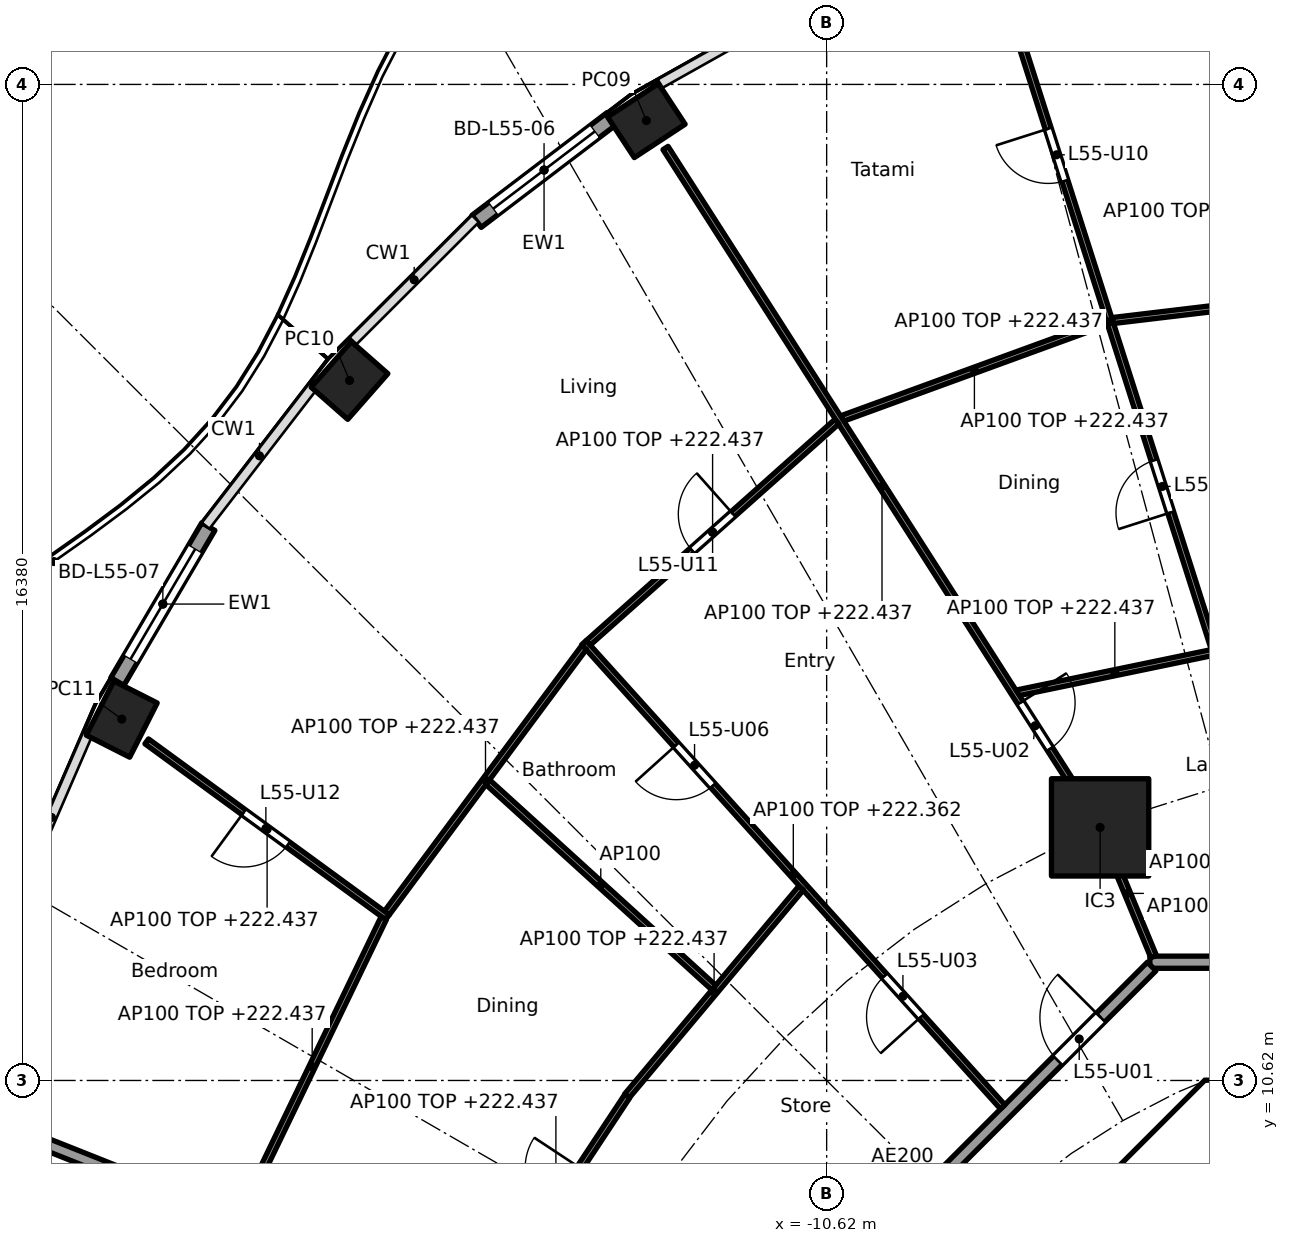
"""IFC4 building model, lengths in metres.
Left out: names, types, materials, properties, quantities, classifications, styles, units other than length and angle.
Written with IfcOpenShell. Run it as: python <this file> out.ifc"""

import sys

from ifc_helpers import new_model, si_unit, direction, frame, frame_2d, origin, origin_2d, place, context, subcontext, project, spatial, polyline, rectangle, hollow_rectangle, outline, extrude, element, fill, save


model = new_model("IFC4")
c1 = context("Model", 3, precision=1e-05, world=origin(), true_north=direction((0.0, 1.0)))
c2 = subcontext(c1, "Body", "Model", "MODEL_VIEW")
j1 = project(units=[si_unit("LENGTHUNIT", "METRE"), si_unit("PLANEANGLEUNIT", "RADIAN")], contexts=[c1])
p1 = place(None, origin())
s1 = spatial("IfcSite", under=j1, at=p1, CompositionType="ELEMENT")
p2 = place(p1, origin())
s2 = spatial("IfcBuilding", under=s1, at=p2, CompositionType="ELEMENT")
p3 = place(p2, frame((0.0, 0.0, 219.6)))
s3 = spatial("IfcBuildingStorey", under=s2, at=p3, CompositionType="ELEMENT", Elevation=219.6)
for number, where, z_axis, x_axis in (
    (1, (-13.585, 26.405, 0.0), (0.0, 0.0, 1.0), (-0.836, -0.549, 0.0)),
    (2, (-18.467, 22.132, 0.0), (0.0, 0.0, 1.0), (-0.66, -0.751, 0.0)),
    (3, (-22.212, 16.563, 0.0), (0.0, 0.0, 1.0), (-0.452, -0.892, 0.0)),
):
    element("IfcColumn", number, at=place(p3, frame(where, z_axis=z_axis, x_axis=x_axis)), inside=s3, PredefinedType="COLUMN", context=c2, shape_type="SweptSolid", body=[
        extrude(hollow_rectangle(XDim=1.0, YDim=0.8, WallThickness=0.032, at=origin_2d()), origin(), (0.0, 0.0, 1.0), 3.7),
    ])
p4 = place(p3, frame((-6.123, 14.782, 0.0), z_axis=(0.0, 0.0, 1.0), x_axis=(1.0, 0.0, 0.0)))
e4 = element("IfcColumn", 4, at=p4, inside=s3, PredefinedType="COLUMN", context=c2, shape_type="SweptSolid", body=[
    extrude(rectangle(XDim=1.6, YDim=1.6, at=origin_2d()), origin(), (0.0, 0.0, 1.0), 3.7),
])
p5 = place(p3, frame((-16.377, 24.748, 0.0), z_axis=(0.0, 0.0, 1.0), x_axis=(0.795990084031, 0.60530966135, 0.0)))
e5 = element("IfcWall", 5, at=p5, inside=s3, PredefinedType="SOLIDWALL", context=c2, shape_type="SweptSolid", body=[
    extrude(rectangle(XDim=2.789, YDim=0.25, at=frame_2d((1.394, 0.0))), origin(), (0.0, 0.0, 1.0), 3.44),
])
p6 = place(p5, frame((0.344, 0.0, 0.0)))
e6 = element("IfcOpeningElement", 6, at=p6, cuts=e5, PredefinedType="OPENING", context=c2, shape_type="SweptSolid", body=[
    extrude(rectangle(XDim=2.1, YDim=2.4, at=frame_2d((1.05, 1.2))), frame((0.0, 0.135, 0.0), z_axis=(0.0, -1.0, 0.0), x_axis=(1.0, 0.0, 0.0)), (0.0, 0.0, 1.0), 0.27),
])
p7 = place(p3, frame((-22.284, 17.181, 0.0), z_axis=(0.0, 0.0, 1.0), x_axis=(0.506330171469, 0.862339699573, 0.0)))
e7 = element("IfcWall", 7, at=p7, inside=s3, PredefinedType="SOLIDWALL", context=c2, shape_type="SweptSolid", body=[
    extrude(rectangle(XDim=2.954, YDim=0.25, at=frame_2d((1.477, 0.0))), origin(), (0.0, 0.0, 1.0), 3.44),
])
p8 = place(p7, frame((0.427, 0.0, 0.0)))
e8 = element("IfcOpeningElement", 8, at=p8, cuts=e7, PredefinedType="OPENING", context=c2, shape_type="SweptSolid", body=[
    extrude(rectangle(XDim=2.1, YDim=2.4, at=frame_2d((1.05, 1.2))), frame((0.0, 0.135, 0.0), z_axis=(0.0, -1.0, 0.0), x_axis=(1.0, 0.0, 0.0)), (0.0, 0.0, 1.0), 0.27),
])
p9 = place(p3, frame((-4.613, 9.988, 0.0), z_axis=(0.0, 0.0, 1.0), x_axis=(-0.707106781187, -0.707106781187, 0.0)))
e9 = element("IfcWall", 9, at=p9, inside=s3, PredefinedType="SHEAR", context=c2, shape_type="SweptSolid", body=[
    extrude(rectangle(XDim=7.602, YDim=0.6, at=frame_2d((3.801, 0.0))), origin(), (0.0, 0.0, 1.0), 3.44),
])
p10 = place(p9, frame((0.351, 0.0, 0.0)))
e10 = element("IfcOpeningElement", 10, at=p10, cuts=e9, PredefinedType="OPENING", context=c2, shape_type="SweptSolid", body=[
    extrude(rectangle(XDim=1.1, YDim=2.1, at=frame_2d((0.55, 1.05))), frame((0.0, 0.31, 0.0), z_axis=(0.0, -1.0, 0.0), x_axis=(1.0, 0.0, 0.0)), (0.0, 0.0, 1.0), 0.62),
])
p11 = place(p3, origin())
e11 = element("IfcWall", 11, at=p11, inside=s3, PredefinedType="SHEAR", context=c2, shape_type="SweptSolid", body=[
    extrude(outline(polyline([(-4.152, 10.025), (-4.401, 9.776), (-4.825, 10.2), (-4.401, 10.625), (4.401, 10.625), (4.825, 10.2), (4.401, 9.776), (4.152, 10.025), (-4.152, 10.025)])), origin(), (0.0, 0.0, 1.0), 3.44),
])
p12 = place(p3, frame((-14.829, 6.141, 0.0), z_axis=(0.0, 0.0, 1.0), x_axis=(-0.929202069098, 0.36957206981, 0.0)))
e12 = element("IfcWall", 12, at=p12, inside=s3, PredefinedType="PARTITIONING", context=c2, shape_type="SweptSolid", body=[
    extrude(rectangle(XDim=9.957, YDim=0.2, at=frame_2d((4.978, 0.0))), origin(), (0.0, 0.0, 1.0), 2.837),
])
p13 = place(p3, frame((5.104, 12.565, 0.0), z_axis=(0.0, 0.0, 1.0), x_axis=(-1.0, 0.0, 0.0)))
e13 = element("IfcWall", 13, at=p13, inside=s3, PredefinedType="PARTITIONING", context=c2, shape_type="SweptSolid", body=[
    extrude(rectangle(XDim=10.409, YDim=0.2, at=frame_2d((5.205, 0.0))), origin(), (0.0, 0.0, 1.0), 3.44),
])
p14 = place(p3, frame((-5.275, 12.494, 0.0), z_axis=(0.0, 0.0, 1.0), x_axis=(-0.707106781187, -0.707106781187, 0.0)))
e14 = element("IfcWall", 14, at=p14, inside=s3, PredefinedType="PARTITIONING", context=c2, shape_type="SweptSolid", body=[
    extrude(rectangle(XDim=10.209, YDim=0.2, at=frame_2d((5.104, 0.0))), origin(), (0.0, 0.0, 1.0), 3.44),
])
p15 = place(p14, frame((1.185, 0.0, 0.0)))
e15 = element("IfcOpeningElement", 15, at=p15, cuts=e14, PredefinedType="OPENING", context=c2, shape_type="SweptSolid", body=[
    extrude(rectangle(XDim=1.0, YDim=2.1, at=frame_2d((0.5, 1.05))), frame((0.0, 0.11, 0.0), z_axis=(0.0, -1.0, 0.0), x_axis=(1.0, 0.0, 0.0)), (0.0, 0.0, 1.0), 0.22),
])
p16 = place(p3, frame((-1.066, 23.695, 0.0), z_axis=(0.0, 0.0, 1.0), x_axis=(-0.992962413335, -0.118429918957, 0.0)))
e16 = element("IfcWall", 16, at=p16, inside=s3, PredefinedType="PARTITIONING", context=c2, shape_type="SweptSolid", body=[
    extrude(rectangle(XDim=4.886, YDim=0.1, at=frame_2d((2.443, 0.0))), origin(), (0.0, 0.0, 1.0), 2.837),
])
p17 = place(p16, frame((2.018, 0.0, 0.0)))
e17 = element("IfcOpeningElement", 17, at=p17, cuts=e16, PredefinedType="OPENING", context=c2, shape_type="SweptSolid", body=[
    extrude(rectangle(XDim=0.9, YDim=2.1, at=frame_2d((0.45, 1.05))), frame((0.0, 0.06, 0.0), z_axis=(0.0, -1.0, 0.0), x_axis=(1.0, 0.0, 0.0)), (0.0, 0.0, 1.0), 0.12),
])
p18 = place(p3, frame((-4.215, 17.62, 0.0), z_axis=(0.0, 0.0, 1.0), x_axis=(-0.303985237897, 0.952676742206, 0.0)))
e18 = element("IfcWall", 18, at=p18, inside=s3, PredefinedType="PARTITIONING", context=c2, shape_type="SweptSolid", body=[
    extrude(rectangle(XDim=11.499, YDim=0.1, at=frame_2d((5.75, 0.0))), origin(), (0.0, 0.0, 1.0), 2.837),
])
p19 = place(p18, frame((2.457, 0.0, 0.0)))
e19 = element("IfcOpeningElement", 19, at=p19, cuts=e18, PredefinedType="OPENING", context=c2, shape_type="SweptSolid", body=[
    extrude(rectangle(XDim=0.9, YDim=2.1, at=frame_2d((0.45, 1.05))), frame((0.0, 0.06, 0.0), z_axis=(0.0, -1.0, 0.0), x_axis=(1.0, 0.0, 0.0)), (0.0, 0.0, 1.0), 0.12),
])
p20 = place(p18, frame((8.181, 0.0, 0.0)))
e20 = element("IfcOpeningElement", 20, at=p20, cuts=e18, PredefinedType="OPENING", context=c2, shape_type="SweptSolid", body=[
    extrude(rectangle(XDim=0.9, YDim=2.1, at=frame_2d((0.45, 1.05))), frame((0.0, 0.06, 0.0), z_axis=(0.0, -1.0, 0.0), x_axis=(1.0, 0.0, 0.0)), (0.0, 0.0, 1.0), 0.12),
])
p21 = place(p3, frame((-4.28, 17.657, 0.0), z_axis=(0.0, 0.0, 1.0), x_axis=(-0.979205232861, -0.202872156637, 0.0)))
e21 = element("IfcWall", 21, at=p21, inside=s3, PredefinedType="PARTITIONING", context=c2, shape_type="SweptSolid", body=[
    extrude(rectangle(XDim=3.271, YDim=0.1, at=frame_2d((1.635, 0.0))), origin(), (0.0, 0.0, 1.0), 2.837),
])
p22 = place(p3, frame((-6.014, 23.094, 0.0), z_axis=(0.0, 0.0, 1.0), x_axis=(-0.939417400947, -0.342775359089, 0.0)))
e22 = element("IfcWall", 22, at=p22, inside=s3, PredefinedType="PARTITIONING", context=c2, shape_type="SweptSolid", body=[
    extrude(rectangle(XDim=4.633, YDim=0.1, at=frame_2d((2.316, 0.0))), origin(), (0.0, 0.0, 1.0), 2.837),
])
p23 = place(p3, frame((-5.243, 12.657, 0.0), z_axis=(0.0, 0.0, 1.0), x_axis=(-0.382757529444, 0.923848837015, 0.0)))
e23 = element("IfcWall", 23, at=p23, inside=s3, PredefinedType="PARTITIONING", context=c2, shape_type="SweptSolid", body=[
    extrude(rectangle(XDim=2.25, YDim=0.1, at=frame_2d((1.125, 0.0))), origin(), (0.0, 0.0, 1.0), 3.44),
])
p24 = place(p3, frame((-6.15, 14.824, 0.0), z_axis=(0.0, 0.0, 1.0), x_axis=(-0.538870687577, 0.842388498301, 0.0)))
e24 = element("IfcWall", 24, at=p24, inside=s3, PredefinedType="PARTITIONING", context=c2, shape_type="SweptSolid", body=[
    extrude(rectangle(XDim=13.213, YDim=0.1, at=frame_2d((6.606, 0.0))), origin(), (0.0, 0.0, 1.0), 2.837),
])
p25 = place(p24, frame((1.483, 0.0, 0.0)))
e25 = element("IfcOpeningElement", 25, at=p25, cuts=e24, PredefinedType="OPENING", context=c2, shape_type="SweptSolid", body=[
    extrude(rectangle(XDim=0.9, YDim=2.1, at=frame_2d((0.45, 1.05))), frame((0.0, 0.06, 0.0), z_axis=(0.0, -1.0, 0.0), x_axis=(1.0, 0.0, 0.0)), (0.0, 0.0, 1.0), 0.12),
])
p26 = place(p3, frame((-10.45, 21.455, 0.0), z_axis=(0.0, 0.0, 1.0), x_axis=(-0.747150931973, -0.66465441009, 0.0)))
e26 = element("IfcWall", 26, at=p26, inside=s3, PredefinedType="PARTITIONING", context=c2, shape_type="SweptSolid", body=[
    extrude(rectangle(XDim=5.475, YDim=0.1, at=frame_2d((2.737, 0.0))), origin(), (0.0, 0.0, 1.0), 2.837),
])
p27 = place(p26, frame((2.288, 0.0, 0.0)))
e27 = element("IfcOpeningElement", 27, at=p27, cuts=e26, PredefinedType="OPENING", context=c2, shape_type="SweptSolid", body=[
    extrude(rectangle(XDim=0.9, YDim=2.1, at=frame_2d((0.45, 1.05))), frame((0.0, 0.06, 0.0), z_axis=(0.0, -1.0, 0.0), x_axis=(1.0, 0.0, 0.0)), (0.0, 0.0, 1.0), 0.12),
])
p28 = place(p3, frame((-7.725, 10.186, 0.0), z_axis=(0.0, 0.0, 1.0), x_axis=(-0.669819599194, 0.742523874725, 0.0)))
e28 = element("IfcWall", 28, at=p28, inside=s3, PredefinedType="PARTITIONING", context=c2, shape_type="SweptSolid", body=[
    extrude(rectangle(XDim=10.282, YDim=0.1, at=frame_2d((5.141, 0.0))), origin(), (0.0, 0.0, 1.0), 2.762),
])
p29 = place(p28, frame((2.0, 0.0, 0.0)))
e29 = element("IfcOpeningElement", 29, at=p29, cuts=e28, PredefinedType="OPENING", context=c2, shape_type="SweptSolid", body=[
    extrude(rectangle(XDim=0.9, YDim=2.1, at=frame_2d((0.45, 1.05))), frame((0.0, 0.06, 0.0), z_axis=(0.0, -1.0, 0.0), x_axis=(1.0, 0.0, 0.0)), (0.0, 0.0, 1.0), 0.12),
])
p30 = place(p28, frame((7.116, 0.0, 0.0)))
e30 = element("IfcOpeningElement", 30, at=p30, cuts=e28, PredefinedType="OPENING", context=c2, shape_type="SweptSolid", body=[
    extrude(rectangle(XDim=0.9, YDim=2.1, at=frame_2d((0.45, 1.05))), frame((0.0, 0.06, 0.0), z_axis=(0.0, -1.0, 0.0), x_axis=(1.0, 0.0, 0.0)), (0.0, 0.0, 1.0), 0.12),
])
p31 = place(p3, frame((-11.039, 13.785, 0.0), z_axis=(0.0, 0.0, 1.0), x_axis=(-0.642254625966, -0.766491353784, 0.0)))
e31 = element("IfcWall", 31, at=p31, inside=s3, PredefinedType="PARTITIONING", context=c2, shape_type="SweptSolid", body=[
    extrude(rectangle(XDim=4.461, YDim=0.1, at=frame_2d((2.23, 0.0))), origin(), (0.0, 0.0, 1.0), 2.837),
])
p32 = place(p3, frame((-14.608, 17.743, 0.0), z_axis=(0.0, 0.0, 1.0), x_axis=(-0.596174489482, -0.8028548923, 0.0)))
e32 = element("IfcWall", 32, at=p32, inside=s3, PredefinedType="PARTITIONING", context=c2, shape_type="SweptSolid", body=[
    extrude(rectangle(XDim=5.442, YDim=0.1, at=frame_2d((2.721, 0.0))), origin(), (0.0, 0.0, 1.0), 2.837),
])
p33 = place(p3, frame((-12.476, 12.147, 0.0), z_axis=(0.0, 0.0, 1.0), x_axis=(-0.740129203525, 0.672464692077, 0.0)))
e33 = element("IfcWall", 33, at=p33, inside=s3, PredefinedType="PARTITIONING", context=c2, shape_type="SweptSolid", body=[
    extrude(rectangle(XDim=5.022, YDim=0.1, at=frame_2d((2.511, 0.0))), origin(), (0.0, 0.0, 1.0), 3.44),
])
p34 = place(p3, frame((-13.899, 10.363, 0.0), z_axis=(0.0, 0.0, 1.0), x_axis=(-0.551267958114, -0.834328255758, 0.0)))
e34 = element("IfcWall", 34, at=p34, inside=s3, PredefinedType="PARTITIONING", context=c2, shape_type="SweptSolid", body=[
    extrude(rectangle(XDim=4.257, YDim=0.1, at=frame_2d((2.129, 0.0))), origin(), (0.0, 0.0, 1.0), 2.837),
])
p35 = place(p34, frame((1.413, 0.0, 0.0)))
e35 = element("IfcOpeningElement", 35, at=p35, cuts=e34, PredefinedType="OPENING", context=c2, shape_type="SweptSolid", body=[
    extrude(rectangle(XDim=0.9, YDim=2.1, at=frame_2d((0.45, 1.05))), frame((0.0, 0.06, 0.0), z_axis=(0.0, -1.0, 0.0), x_axis=(1.0, 0.0, 0.0)), (0.0, 0.0, 1.0), 0.12),
])
p36 = place(p3, frame((-17.842, 13.304, 0.0), z_axis=(0.0, 0.0, 1.0), x_axis=(-0.807541617862, 0.589810592835, 0.0)))
e36 = element("IfcWall", 36, at=p36, inside=s3, PredefinedType="PARTITIONING", context=c2, shape_type="SweptSolid", body=[
    extrude(rectangle(XDim=4.903, YDim=0.1, at=frame_2d((2.452, 0.0))), origin(), (0.0, 0.0, 1.0), 2.837),
])
p37 = place(p36, frame((2.027, 0.0, 0.0)))
e37 = element("IfcOpeningElement", 37, at=p37, cuts=e36, PredefinedType="OPENING", context=c2, shape_type="SweptSolid", body=[
    extrude(rectangle(XDim=0.9, YDim=2.1, at=frame_2d((0.45, 1.05))), frame((0.0, 0.06, 0.0), z_axis=(0.0, -1.0, 0.0), x_axis=(1.0, 0.0, 0.0)), (0.0, 0.0, 1.0), 0.12),
])
p38 = place(p3, frame((-17.904, 13.289, 0.0), z_axis=(0.0, 0.0, 1.0), x_axis=(-0.43429918566, -0.900768681369, 0.0)))
e38 = element("IfcWall", 38, at=p38, inside=s3, PredefinedType="PARTITIONING", context=c2, shape_type="SweptSolid", body=[
    extrude(rectangle(XDim=5.418, YDim=0.1, at=frame_2d((2.709, 0.0))), origin(), (0.0, 0.0, 1.0), 2.837),
])
p39 = place(p6, origin())
e39 = element("IfcDoor", 39, at=p39, inside=s3, OperationType="SLIDING_TO_LEFT", PredefinedType="DOOR", context=c2, shape_type="SweptSolid", body=[
    extrude(rectangle(XDim=2.1, YDim=2.4, at=frame_2d((1.05, 1.2))), frame((0.0, 0.025, 0.0), z_axis=(0.0, -1.0, 0.0), x_axis=(1.0, 0.0, 0.0)), (0.0, 0.0, 1.0), 0.05),
])
fill(e6, e39)
p40 = place(p8, origin())
e40 = element("IfcDoor", 40, at=p40, inside=s3, OperationType="SLIDING_TO_LEFT", PredefinedType="DOOR", context=c2, shape_type="SweptSolid", body=[
    extrude(rectangle(XDim=2.1, YDim=2.4, at=frame_2d((1.05, 1.2))), frame((0.0, 0.025, 0.0), z_axis=(0.0, -1.0, 0.0), x_axis=(1.0, 0.0, 0.0)), (0.0, 0.0, 1.0), 0.05),
])
fill(e8, e40)
p41 = place(p10, origin())
e41 = element("IfcDoor", 41, at=p41, inside=s3, OperationType="SINGLE_SWING_RIGHT", PredefinedType="DOOR", context=c2, shape_type="SweptSolid", body=[
    extrude(rectangle(XDim=1.1, YDim=2.1, at=frame_2d((0.55, 1.05))), frame((0.0, 0.025, 0.0), z_axis=(0.0, -1.0, 0.0), x_axis=(1.0, 0.0, 0.0)), (0.0, 0.0, 1.0), 0.05),
])
fill(e10, e41)
p42 = place(p15, frame((1.0, 0.0, 0.0), x_axis=(-1.0, 0.0, 0.0)))
e42 = element("IfcDoor", 42, at=p42, inside=s3, OperationType="SINGLE_SWING_RIGHT", PredefinedType="DOOR", context=c2, shape_type="SweptSolid", body=[
    extrude(rectangle(XDim=1.0, YDim=2.1, at=frame_2d((0.5, 1.05))), frame((0.0, 0.025, 0.0), z_axis=(0.0, -1.0, 0.0), x_axis=(1.0, 0.0, 0.0)), (0.0, 0.0, 1.0), 0.05),
])
fill(e15, e42)
p43 = place(p25, frame((0.9, 0.0, 0.0), x_axis=(-1.0, 0.0, 0.0)))
e43 = element("IfcDoor", 43, at=p43, inside=s3, OperationType="SINGLE_SWING_LEFT", PredefinedType="DOOR", context=c2, shape_type="SweptSolid", body=[
    extrude(rectangle(XDim=0.9, YDim=2.1, at=frame_2d((0.45, 1.05))), frame((0.0, 0.025, 0.0), z_axis=(0.0, -1.0, 0.0), x_axis=(1.0, 0.0, 0.0)), (0.0, 0.0, 1.0), 0.05),
])
fill(e25, e43)
p44 = place(p29, origin())
e44 = element("IfcDoor", 44, at=p44, inside=s3, OperationType="SINGLE_SWING_LEFT", PredefinedType="DOOR", context=c2, shape_type="SweptSolid", body=[
    extrude(rectangle(XDim=0.9, YDim=2.1, at=frame_2d((0.45, 1.05))), frame((0.0, 0.025, 0.0), z_axis=(0.0, -1.0, 0.0), x_axis=(1.0, 0.0, 0.0)), (0.0, 0.0, 1.0), 0.05),
])
fill(e29, e44)
p45 = place(p19, origin())
e45 = element("IfcDoor", 45, at=p45, inside=s3, OperationType="SINGLE_SWING_LEFT", PredefinedType="DOOR", context=c2, shape_type="SweptSolid", body=[
    extrude(rectangle(XDim=0.9, YDim=2.1, at=frame_2d((0.45, 1.05))), frame((0.0, 0.025, 0.0), z_axis=(0.0, -1.0, 0.0), x_axis=(1.0, 0.0, 0.0)), (0.0, 0.0, 1.0), 0.05),
])
fill(e19, e45)
p46 = place(p30, origin())
e46 = element("IfcDoor", 46, at=p46, inside=s3, OperationType="SINGLE_SWING_RIGHT", PredefinedType="DOOR", context=c2, shape_type="SweptSolid", body=[
    extrude(rectangle(XDim=0.9, YDim=2.1, at=frame_2d((0.45, 1.05))), frame((0.0, 0.025, 0.0), z_axis=(0.0, -1.0, 0.0), x_axis=(1.0, 0.0, 0.0)), (0.0, 0.0, 1.0), 0.05),
])
fill(e30, e46)
p47 = place(p20, origin())
e47 = element("IfcDoor", 47, at=p47, inside=s3, OperationType="SINGLE_SWING_RIGHT", PredefinedType="DOOR", context=c2, shape_type="SweptSolid", body=[
    extrude(rectangle(XDim=0.9, YDim=2.1, at=frame_2d((0.45, 1.05))), frame((0.0, 0.025, 0.0), z_axis=(0.0, -1.0, 0.0), x_axis=(1.0, 0.0, 0.0)), (0.0, 0.0, 1.0), 0.05),
])
fill(e20, e47)
p48 = place(p27, frame((0.9, 0.0, 0.0), x_axis=(-1.0, 0.0, 0.0)))
e48 = element("IfcDoor", 48, at=p48, inside=s3, OperationType="SINGLE_SWING_RIGHT", PredefinedType="DOOR", context=c2, shape_type="SweptSolid", body=[
    extrude(rectangle(XDim=0.9, YDim=2.1, at=frame_2d((0.45, 1.05))), frame((0.0, 0.025, 0.0), z_axis=(0.0, -1.0, 0.0), x_axis=(1.0, 0.0, 0.0)), (0.0, 0.0, 1.0), 0.05),
])
fill(e27, e48)
p49 = place(p37, origin())
e49 = element("IfcDoor", 49, at=p49, inside=s3, OperationType="SINGLE_SWING_RIGHT", PredefinedType="DOOR", context=c2, shape_type="SweptSolid", body=[
    extrude(rectangle(XDim=0.9, YDim=2.1, at=frame_2d((0.45, 1.05))), frame((0.0, 0.025, 0.0), z_axis=(0.0, -1.0, 0.0), x_axis=(1.0, 0.0, 0.0)), (0.0, 0.0, 1.0), 0.05),
])
fill(e37, e49)
save(model, sys.argv[1])
